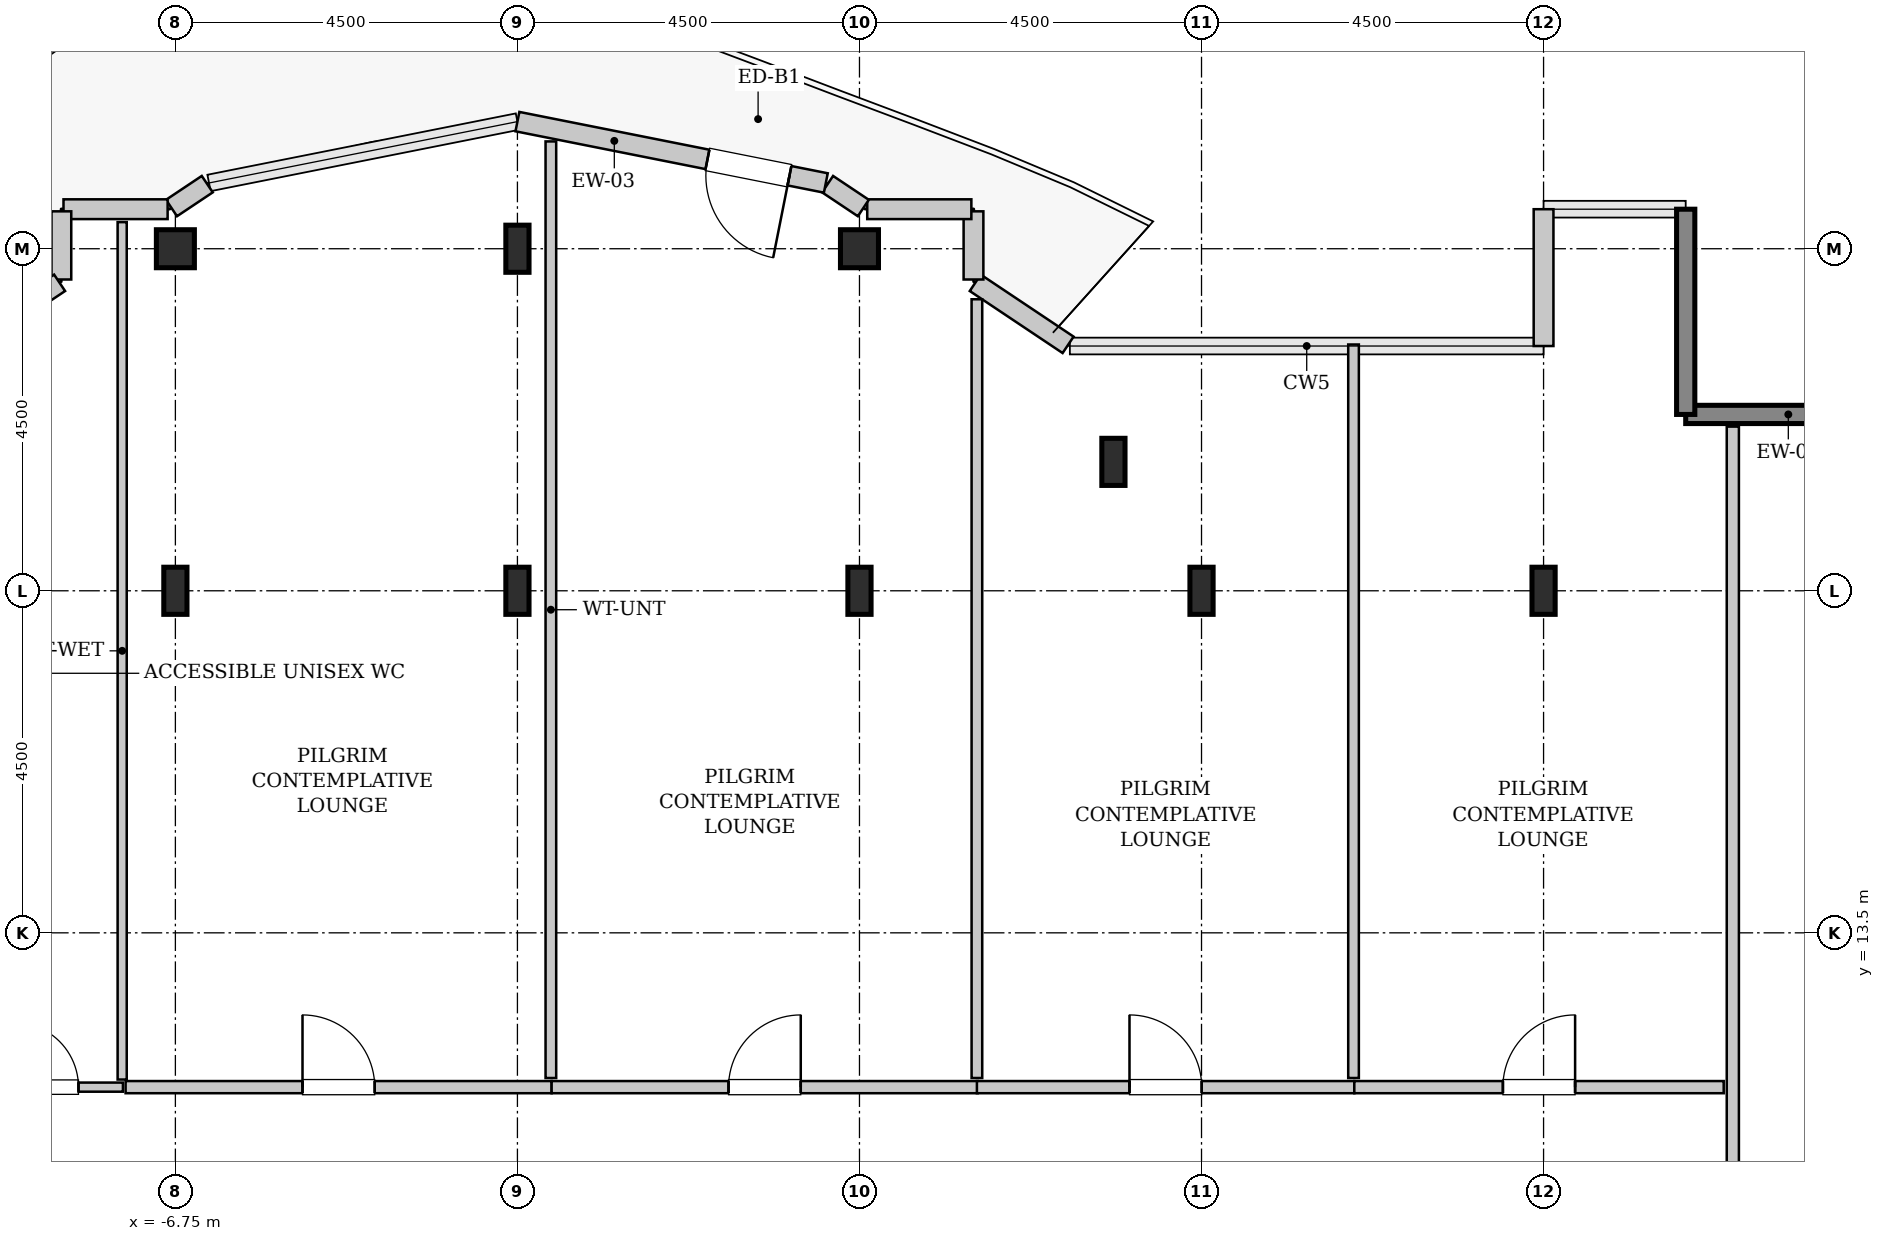
"""IFC4 building model, lengths in metres.
Left out: names, types, materials, properties, quantities, classifications, styles, units other than length and angle.
Written with IfcOpenShell. Run it as: python <this file> out.ifc"""

import sys

from ifc_helpers import new_model, si_unit, direction, frame, frame_2d, origin, origin_2d, place, context, subcontext, project, spatial, rectangle, hollow_rectangle, i_section, extrude, source, transform, mapped, element, fill, save


model = new_model("IFC4")
c1 = context("Model", 3, precision=1e-05, world=origin(), true_north=direction((0.0, 1.0)))
c2 = subcontext(c1, "Body", "Model", "MODEL_VIEW")
j1 = project(units=[si_unit("LENGTHUNIT", "METRE"), si_unit("PLANEANGLEUNIT", "RADIAN")], contexts=[c1])
p1 = place(None, origin())
s1 = spatial("IfcSite", under=j1, at=p1, CompositionType="ELEMENT")
p2 = place(p1, origin())
s2 = spatial("IfcBuilding", under=s1, at=p2, CompositionType="ELEMENT")
p3 = place(p2, frame((0.0, 0.0, 314.0)))
s3 = spatial("IfcBuildingStorey", under=s2, at=p3, CompositionType="ELEMENT", Elevation=314.0)
m1 = source(origin(), c2, "Body", "SweptSolid", [
    extrude(i_section(OverallWidth=0.305, OverallDepth=0.62, WebThickness=0.021, FlangeThickness=0.04, FilletRadius=0.027, at=origin_2d()), origin(), (0.0, 0.0, 1.0), 3.8),
])
p4 = place(p3, frame((-6.75, 18.0, 0.0), z_axis=(0.0, 0.0, 1.0), x_axis=(1.0, 0.0, 0.0)))
e1 = element("IfcColumn", 1, at=p4, inside=s3, PredefinedType="COLUMN", context=c2, shape_type="MappedRepresentation", body=[
    mapped(m1, transform((0.0, 0.0, 0.0), x_axis=(1.0, 0.0, 0.0), y_axis=(0.0, 1.0, 0.0), z_axis=(0.0, 0.0, 1.0), scale=1.0)),
])
m2 = source(origin(), c2, "Body", "SweptSolid", [
    extrude(hollow_rectangle(XDim=0.5, YDim=0.5, WallThickness=0.025, InnerFilletRadius=0.025, OuterFilletRadius=0.05, at=origin_2d()), origin(), (0.0, 0.0, 1.0), 3.8),
])
p5 = place(p3, frame((-6.75, 22.5, 0.0), z_axis=(0.0, 0.0, 1.0), x_axis=(1.0, 0.0, 0.0)))
e2 = element("IfcColumn", 2, at=p5, inside=s3, PredefinedType="COLUMN", context=c2, shape_type="MappedRepresentation", body=[
    mapped(m2, transform((0.0, 0.0, 0.0), x_axis=(1.0, 0.0, 0.0), y_axis=(0.0, 1.0, 0.0), z_axis=(0.0, 0.0, 1.0), scale=1.0)),
])
for number, where, z_axis, x_axis in (
    (3, (-2.25, 18.0, 0.0), (0.0, 0.0, 1.0), (1.0, 0.0, 0.0)),
    (4, (-2.25, 22.5, 0.0), (0.0, 0.0, 1.0), (1.0, 0.0, 0.0)),
    (5, (2.25, 18.0, 0.0), (0.0, 0.0, 1.0), (1.0, 0.0, 0.0)),
):
    element("IfcColumn", number, at=place(p3, frame(where, z_axis=z_axis, x_axis=x_axis)), inside=s3, PredefinedType="COLUMN", context=c2, shape_type="MappedRepresentation", body=[
        mapped(m1, transform((0.0, 0.0, 0.0), x_axis=(1.0, 0.0, 0.0), y_axis=(0.0, 1.0, 0.0), z_axis=(0.0, 0.0, 1.0), scale=1.0)),
    ])
p6 = place(p3, frame((2.25, 22.5, 0.0), z_axis=(0.0, 0.0, 1.0), x_axis=(1.0, 0.0, 0.0)))
e6 = element("IfcColumn", 6, at=p6, inside=s3, PredefinedType="COLUMN", context=c2, shape_type="MappedRepresentation", body=[
    mapped(m2, transform((0.0, 0.0, 0.0), x_axis=(1.0, 0.0, 0.0), y_axis=(0.0, 1.0, 0.0), z_axis=(0.0, 0.0, 1.0), scale=1.0)),
])
for number, where, z_axis, x_axis in (
    (7, (5.591, 19.696, 0.0), (0.0, 0.0, 1.0), (1.0, 0.0, 0.0)),
    (8, (6.75, 18.0, 0.0), (0.0, 0.0, 1.0), (1.0, 0.0, 0.0)),
    (9, (11.25, 18.0, 0.0), (0.0, 0.0, 1.0), (1.0, 0.0, 0.0)),
):
    element("IfcColumn", number, at=place(p3, frame(where, z_axis=z_axis, x_axis=x_axis)), inside=s3, PredefinedType="COLUMN", context=c2, shape_type="MappedRepresentation", body=[
        mapped(m1, transform((0.0, 0.0, 0.0), x_axis=(1.0, 0.0, 0.0), y_axis=(0.0, 1.0, 0.0), z_axis=(0.0, 0.0, 1.0), scale=1.0)),
    ])
m3 = source(origin(), c2, "Body", "SweptSolid", [
    extrude(rectangle(XDim=2.7, YDim=0.24, at=frame_2d((1.35, 0.0))), origin(), (0.0, 0.0, 1.0), 3.5),
])
for number, where, z_axis, x_axis in (
    (10, (15.82, 20.32, 0.0), (0.0, 0.0, 1.0), (-1.0, 0.0, 0.0)),
    (11, (13.12, 20.32, 0.0), (0.0, 0.0, 1.0), (0.0, 1.0, 0.0)),
):
    element("IfcWall", number, at=place(p3, frame(where, z_axis=z_axis, x_axis=x_axis)), inside=s3, PredefinedType="SHEAR", context=c2, shape_type="MappedRepresentation", body=[
        mapped(m3, transform((0.0, 0.0, 0.0), x_axis=(1.0, 0.0, 0.0), y_axis=(0.0, 1.0, 0.0), z_axis=(0.0, 0.0, 1.0), scale=1.0)),
    ])
m4 = source(origin(), c2, "Body", "SweptSolid", [
    extrude(rectangle(XDim=1.8, YDim=0.26, at=frame_2d((0.9, 0.0))), origin(), (0.0, 0.0, 1.0), 3.5),
])
p7 = place(p3, frame((11.25, 23.02, 0.0), z_axis=(0.0, 0.0, 1.0), x_axis=(0.0, -1.0, 0.0)))
e12 = element("IfcWall", 12, at=p7, inside=s3, PredefinedType="SOLIDWALL", context=c2, shape_type="MappedRepresentation", body=[
    mapped(m4, transform((0.0, 0.0, 0.0), x_axis=(1.0, 0.0, 0.0), y_axis=(0.0, 1.0, 0.0), z_axis=(0.0, 0.0, 1.0), scale=1.0)),
])
m5 = source(origin(), c2, "Body", "SweptSolid", [
    extrude(rectangle(XDim=1.469, YDim=0.26, at=frame_2d((0.734, 0.0))), origin(), (0.0, 0.0, 1.0), 3.5),
])
p8 = place(p3, frame((4.995, 21.236, 0.0), z_axis=(0.0, 0.0, 1.0), x_axis=(-0.831461760506, 0.555581983884, 0.0)))
e13 = element("IfcWall", 13, at=p8, inside=s3, PredefinedType="SOLIDWALL", context=c2, shape_type="MappedRepresentation", body=[
    mapped(m5, transform((0.0, 0.0, 0.0), x_axis=(1.0, 0.0, 0.0), y_axis=(0.0, 1.0, 0.0), z_axis=(0.0, 0.0, 1.0), scale=1.0)),
])
m6 = source(origin(), c2, "Body", "SweptSolid", [
    extrude(rectangle(XDim=0.897, YDim=0.26, at=frame_2d((0.448, 0.0))), origin(), (0.0, 0.0, 1.0), 3.5),
])
p9 = place(p3, frame((3.75, 22.095, 0.0), z_axis=(0.0, 0.0, 1.0), x_axis=(0.0, 1.0, 0.0)))
e14 = element("IfcWall", 14, at=p9, inside=s3, PredefinedType="SOLIDWALL", context=c2, shape_type="MappedRepresentation", body=[
    mapped(m6, transform((0.0, 0.0, 0.0), x_axis=(1.0, 0.0, 0.0), y_axis=(0.0, 1.0, 0.0), z_axis=(0.0, 0.0, 1.0), scale=1.0)),
])
m7 = source(origin(), c2, "Body", "SweptSolid", [
    extrude(rectangle(XDim=1.37, YDim=0.26, at=frame_2d((0.685, 0.0))), origin(), (0.0, 0.0, 1.0), 3.5),
])
p10 = place(p3, frame((3.722, 23.02, 0.0), z_axis=(0.0, 0.0, 1.0), x_axis=(-1.0, 0.0, 0.0)))
e15 = element("IfcWall", 15, at=p10, inside=s3, PredefinedType="SOLIDWALL", context=c2, shape_type="MappedRepresentation", body=[
    mapped(m7, transform((0.0, 0.0, 0.0), x_axis=(1.0, 0.0, 0.0), y_axis=(0.0, 1.0, 0.0), z_axis=(0.0, 0.0, 1.0), scale=1.0)),
])
m8 = source(origin(), c2, "Body", "SweptSolid", [
    extrude(rectangle(XDim=0.565, YDim=0.26, at=frame_2d((0.283, 0.0))), origin(), (0.0, 0.0, 1.0), 3.5),
])
p11 = place(p3, frame((2.301, 23.036, 0.0), z_axis=(0.0, 0.0, 1.0), x_axis=(-0.831651492666, 0.555297933317, 0.0)))
e16 = element("IfcWall", 16, at=p11, inside=s3, PredefinedType="SOLIDWALL", context=c2, shape_type="MappedRepresentation", body=[
    mapped(m8, transform((0.0, 0.0, 0.0), x_axis=(1.0, 0.0, 0.0), y_axis=(0.0, 1.0, 0.0), z_axis=(0.0, 0.0, 1.0), scale=1.0)),
])
m9 = source(origin(), c2, "Body", "SweptSolid", [
    extrude(rectangle(XDim=4.137, YDim=0.26, at=frame_2d((2.068, 0.0))), origin(), (0.0, 0.0, 1.0), 3.5),
])
p12 = place(p3, frame((1.807, 23.365, 0.0), z_axis=(0.0, 0.0, 1.0), x_axis=(-0.980782170794, 0.195105954428, 0.0)))
e17 = element("IfcWall", 17, at=p12, inside=s3, PredefinedType="SOLIDWALL", context=c2, shape_type="MappedRepresentation", body=[
    mapped(m9, transform((0.0, 0.0, 0.0), x_axis=(1.0, 0.0, 0.0), y_axis=(0.0, 1.0, 0.0), z_axis=(0.0, 0.0, 1.0), scale=1.0)),
])
p13 = place(p12, frame((0.488, 0.0, 0.0)))
e18 = element("IfcOpeningElement", 18, at=p13, cuts=e17, PredefinedType="OPENING", context=c2, shape_type="SweptSolid", body=[
    extrude(rectangle(XDim=1.1, YDim=2.2, at=frame_2d((0.55, 1.1))), frame((0.0, 0.14, 0.0), z_axis=(0.0, -1.0, 0.0), x_axis=(1.0, 0.0, 0.0)), (0.0, 0.0, 1.0), 0.28),
])
p14 = place(p3, frame((-6.331, 23.35, 0.0), z_axis=(0.0, 0.0, 1.0), x_axis=(-0.831651492666, -0.555297933317, 0.0)))
e19 = element("IfcWall", 19, at=p14, inside=s3, PredefinedType="SOLIDWALL", context=c2, shape_type="MappedRepresentation", body=[
    mapped(m8, transform((0.0, 0.0, 0.0), x_axis=(1.0, 0.0, 0.0), y_axis=(0.0, 1.0, 0.0), z_axis=(0.0, 0.0, 1.0), scale=1.0)),
])
p15 = place(p3, frame((-6.852, 23.02, 0.0), z_axis=(0.0, 0.0, 1.0), x_axis=(-1.0, 0.0, 0.0)))
e20 = element("IfcWall", 20, at=p15, inside=s3, PredefinedType="SOLIDWALL", context=c2, shape_type="MappedRepresentation", body=[
    mapped(m7, transform((0.0, 0.0, 0.0), x_axis=(1.0, 0.0, 0.0), y_axis=(0.0, 1.0, 0.0), z_axis=(0.0, 0.0, 1.0), scale=1.0)),
])
p16 = place(p3, frame((-8.25, 22.992, 0.0), z_axis=(0.0, 0.0, 1.0), x_axis=(0.0, -1.0, 0.0)))
e21 = element("IfcWall", 21, at=p16, inside=s3, PredefinedType="SOLIDWALL", context=c2, shape_type="MappedRepresentation", body=[
    mapped(m6, transform((0.0, 0.0, 0.0), x_axis=(1.0, 0.0, 0.0), y_axis=(0.0, 1.0, 0.0), z_axis=(0.0, 0.0, 1.0), scale=1.0)),
])
p17 = place(p3, frame((-8.273, 22.052, 0.0), z_axis=(0.0, 0.0, 1.0), x_axis=(-0.831461760506, -0.555581983884, 0.0)))
e22 = element("IfcWall", 22, at=p17, inside=s3, PredefinedType="SOLIDWALL", context=c2, shape_type="MappedRepresentation", body=[
    mapped(m5, transform((0.0, 0.0, 0.0), x_axis=(1.0, 0.0, 0.0), y_axis=(0.0, 1.0, 0.0), z_axis=(0.0, 0.0, 1.0), scale=1.0)),
])
m10 = source(origin(), c2, "Body", "SweptSolid", [
    extrude(rectangle(XDim=2.02, YDim=0.12, at=frame_2d((1.01, 0.0))), origin(), (0.0, 0.0, 1.0), 3.485),
])
p18 = place(p3, frame((-9.46, 11.47, 0.0), z_axis=(0.0, 0.0, 1.0), x_axis=(1.0, 0.0, 0.0)))
e23 = element("IfcWall", 23, at=p18, inside=s3, PredefinedType="PLUMBINGWALL", context=c2, shape_type="MappedRepresentation", body=[
    mapped(m10, transform((0.0, 0.0, 0.0), x_axis=(1.0, 0.0, 0.0), y_axis=(0.0, 1.0, 0.0), z_axis=(0.0, 0.0, 1.0), scale=1.0)),
])
p19 = place(p18, frame((0.585, 0.0, 0.0)))
e24 = element("IfcOpeningElement", 24, at=p19, cuts=e23, PredefinedType="OPENING", context=c2, shape_type="SweptSolid", body=[
    extrude(rectangle(XDim=0.85, YDim=2.1, at=frame_2d((0.425, 1.05))), frame((0.0, 0.07, 0.0), z_axis=(0.0, -1.0, 0.0), x_axis=(1.0, 0.0, 0.0)), (0.0, 0.0, 1.0), 0.14),
])
m11 = source(origin(), c2, "Body", "SweptSolid", [
    extrude(rectangle(XDim=11.28, YDim=0.12, at=frame_2d((5.64, 0.0))), origin(), (0.0, 0.0, 1.0), 3.485),
])
p20 = place(p3, frame((-7.45, 11.57, 0.0), z_axis=(0.0, 0.0, 1.0), x_axis=(0.0, 1.0, 0.0)))
e25 = element("IfcWall", 25, at=p20, inside=s3, PredefinedType="PLUMBINGWALL", context=c2, shape_type="MappedRepresentation", body=[
    mapped(m11, transform((0.0, 0.0, 0.0), x_axis=(1.0, 0.0, 0.0), y_axis=(0.0, 1.0, 0.0), z_axis=(0.0, 0.0, 1.0), scale=1.0)),
])
m12 = source(origin(), c2, "Body", "SweptSolid", [
    extrude(rectangle(XDim=12.565, YDim=0.16, at=frame_2d((6.282, 0.0))), origin(), (0.0, 0.0, 1.0), 3.485),
])
p21 = place(p3, frame((13.74, 7.595, 0.0), z_axis=(0.0, 0.0, 1.0), x_axis=(0.0, 1.0, 0.0)))
e26 = element("IfcWall", 26, at=p21, inside=s3, PredefinedType="PARTITIONING", context=c2, shape_type="MappedRepresentation", body=[
    mapped(m12, transform((0.0, 0.0, 0.0), x_axis=(1.0, 0.0, 0.0), y_axis=(0.0, 1.0, 0.0), z_axis=(0.0, 0.0, 1.0), scale=1.0)),
])
p22 = place(p21, frame((1.482, 0.0, 0.0)))
e27 = element("IfcOpeningElement", 27, at=p22, cuts=e26, PredefinedType="OPENING", context=c2, shape_type="SweptSolid", body=[
    extrude(rectangle(XDim=0.95, YDim=2.1, at=frame_2d((0.475, 1.05))), frame((0.0, 0.09, 0.0), z_axis=(0.0, -1.0, 0.0), x_axis=(1.0, 0.0, 0.0)), (0.0, 0.0, 1.0), 0.18),
])
m13 = source(origin(), c2, "Body", "SweptSolid", [
    extrude(rectangle(XDim=5.605, YDim=0.16, at=frame_2d((2.802, 0.0))), origin(), (0.0, 0.0, 1.0), 3.485),
])
p23 = place(p3, frame((-7.405, 11.47, 0.0), z_axis=(0.0, 0.0, 1.0), x_axis=(1.0, 0.0, 0.0)))
e28 = element("IfcWall", 28, at=p23, inside=s3, PredefinedType="PARTITIONING", context=c2, shape_type="MappedRepresentation", body=[
    mapped(m13, transform((0.0, 0.0, 0.0), x_axis=(1.0, 0.0, 0.0), y_axis=(0.0, 1.0, 0.0), z_axis=(0.0, 0.0, 1.0), scale=1.0)),
])
p24 = place(p23, frame((2.327, 0.0, 0.0)))
e29 = element("IfcOpeningElement", 29, at=p24, cuts=e28, PredefinedType="OPENING", context=c2, shape_type="SweptSolid", body=[
    extrude(rectangle(XDim=0.95, YDim=2.1, at=frame_2d((0.475, 1.05))), frame((0.0, 0.09, 0.0), z_axis=(0.0, -1.0, 0.0), x_axis=(1.0, 0.0, 0.0)), (0.0, 0.0, 1.0), 0.18),
])
m14 = source(origin(), c2, "Body", "SweptSolid", [
    extrude(rectangle(XDim=12.322, YDim=0.14, at=frame_2d((6.161, 0.0))), origin(), (0.0, 0.0, 1.0), 2.925),
])
p25 = place(p3, frame((-1.81, 11.59, 0.0), z_axis=(0.0, 0.0, 1.0), x_axis=(0.0, 1.0, 0.0)))
e30 = element("IfcWall", 30, at=p25, inside=s3, PredefinedType="PARTITIONING", context=c2, shape_type="MappedRepresentation", body=[
    mapped(m14, transform((0.0, 0.0, 0.0), x_axis=(1.0, 0.0, 0.0), y_axis=(0.0, 1.0, 0.0), z_axis=(0.0, 0.0, 1.0), scale=1.0)),
])
p26 = place(p3, frame((-1.8, 11.47, 0.0), z_axis=(0.0, 0.0, 1.0), x_axis=(1.0, 0.0, 0.0)))
e31 = element("IfcWall", 31, at=p26, inside=s3, PredefinedType="PARTITIONING", context=c2, shape_type="MappedRepresentation", body=[
    mapped(m13, transform((0.0, 0.0, 0.0), x_axis=(1.0, 0.0, 0.0), y_axis=(0.0, 1.0, 0.0), z_axis=(0.0, 0.0, 1.0), scale=1.0)),
])
p27 = place(p26, frame((2.327, 0.0, 0.0)))
e32 = element("IfcOpeningElement", 32, at=p27, cuts=e31, PredefinedType="OPENING", context=c2, shape_type="SweptSolid", body=[
    extrude(rectangle(XDim=0.95, YDim=2.1, at=frame_2d((0.475, 1.05))), frame((0.0, 0.09, 0.0), z_axis=(0.0, -1.0, 0.0), x_axis=(1.0, 0.0, 0.0)), (0.0, 0.0, 1.0), 0.18),
])
m15 = source(origin(), c2, "Body", "SweptSolid", [
    extrude(rectangle(XDim=10.245, YDim=0.14, at=frame_2d((5.123, 0.0))), origin(), (0.0, 0.0, 1.0), 3.485),
])
p28 = place(p3, frame((3.795, 11.59, 0.0), z_axis=(0.0, 0.0, 1.0), x_axis=(0.0, 1.0, 0.0)))
e33 = element("IfcWall", 33, at=p28, inside=s3, PredefinedType="PARTITIONING", context=c2, shape_type="MappedRepresentation", body=[
    mapped(m15, transform((0.0, 0.0, 0.0), x_axis=(1.0, 0.0, 0.0), y_axis=(0.0, 1.0, 0.0), z_axis=(0.0, 0.0, 1.0), scale=1.0)),
])
m16 = source(origin(), c2, "Body", "SweptSolid", [
    extrude(rectangle(XDim=4.965, YDim=0.16, at=frame_2d((2.482, 0.0))), origin(), (0.0, 0.0, 1.0), 3.485),
])
p29 = place(p3, frame((3.795, 11.47, 0.0), z_axis=(0.0, 0.0, 1.0), x_axis=(1.0, 0.0, 0.0)))
e34 = element("IfcWall", 34, at=p29, inside=s3, PredefinedType="PARTITIONING", context=c2, shape_type="MappedRepresentation", body=[
    mapped(m16, transform((0.0, 0.0, 0.0), x_axis=(1.0, 0.0, 0.0), y_axis=(0.0, 1.0, 0.0), z_axis=(0.0, 0.0, 1.0), scale=1.0)),
])
p30 = place(p29, frame((2.008, 0.0, 0.0)))
e35 = element("IfcOpeningElement", 35, at=p30, cuts=e34, PredefinedType="OPENING", context=c2, shape_type="SweptSolid", body=[
    extrude(rectangle(XDim=0.95, YDim=2.1, at=frame_2d((0.475, 1.05))), frame((0.0, 0.09, 0.0), z_axis=(0.0, -1.0, 0.0), x_axis=(1.0, 0.0, 0.0)), (0.0, 0.0, 1.0), 0.18),
])
m17 = source(origin(), c2, "Body", "SweptSolid", [
    extrude(rectangle(XDim=9.65, YDim=0.14, at=frame_2d((4.825, 0.0))), origin(), (0.0, 0.0, 1.0), 3.485),
])
p31 = place(p3, frame((8.75, 11.59, 0.0), z_axis=(0.0, 0.0, 1.0), x_axis=(0.0, 1.0, 0.0)))
e36 = element("IfcWall", 36, at=p31, inside=s3, PredefinedType="PARTITIONING", context=c2, shape_type="MappedRepresentation", body=[
    mapped(m17, transform((0.0, 0.0, 0.0), x_axis=(1.0, 0.0, 0.0), y_axis=(0.0, 1.0, 0.0), z_axis=(0.0, 0.0, 1.0), scale=1.0)),
])
m18 = source(origin(), c2, "Body", "SweptSolid", [
    extrude(rectangle(XDim=4.86, YDim=0.16, at=frame_2d((2.43, 0.0))), origin(), (0.0, 0.0, 1.0), 3.485),
])
p32 = place(p3, frame((8.76, 11.47, 0.0), z_axis=(0.0, 0.0, 1.0), x_axis=(1.0, 0.0, 0.0)))
e37 = element("IfcWall", 37, at=p32, inside=s3, PredefinedType="PARTITIONING", context=c2, shape_type="MappedRepresentation", body=[
    mapped(m18, transform((0.0, 0.0, 0.0), x_axis=(1.0, 0.0, 0.0), y_axis=(0.0, 1.0, 0.0), z_axis=(0.0, 0.0, 1.0), scale=1.0)),
])
p33 = place(p32, frame((1.955, 0.0, 0.0)))
e38 = element("IfcOpeningElement", 38, at=p33, cuts=e37, PredefinedType="OPENING", context=c2, shape_type="SweptSolid", body=[
    extrude(rectangle(XDim=0.95, YDim=2.1, at=frame_2d((0.475, 1.05))), frame((0.0, 0.09, 0.0), z_axis=(0.0, -1.0, 0.0), x_axis=(1.0, 0.0, 0.0)), (0.0, 0.0, 1.0), 0.18),
])
m19 = source(origin(), c2, "Body", "SweptSolid", [
    extrude(rectangle(XDim=1.1, YDim=2.2, at=frame_2d((0.55, 1.1))), frame((0.0, 0.025, 0.0), z_axis=(0.0, -1.0, 0.0), x_axis=(1.0, 0.0, 0.0)), (0.0, 0.0, 1.0), 0.05),
])
p34 = place(p13, origin())
e39 = element("IfcDoor", 39, at=p34, inside=s3, OperationType="SINGLE_SWING_LEFT", PredefinedType="DOOR", context=c2, shape_type="MappedRepresentation", body=[
    mapped(m19, transform((0.0, 0.0, 0.0), x_axis=(1.0, 0.0, 0.0), y_axis=(0.0, 1.0, 0.0), z_axis=(0.0, 0.0, 1.0), scale=1.0)),
])
fill(e18, e39)
m20 = source(origin(), c2, "Body", "SweptSolid", [
    extrude(rectangle(XDim=0.85, YDim=2.1, at=frame_2d((0.425, 1.05))), frame((0.0, 0.025, 0.0), z_axis=(0.0, -1.0, 0.0), x_axis=(1.0, 0.0, 0.0)), (0.0, 0.0, 1.0), 0.05),
])
p35 = place(p19, origin())
e40 = element("IfcDoor", 40, at=p35, inside=s3, OperationType="SINGLE_SWING_LEFT", PredefinedType="DOOR", context=c2, shape_type="MappedRepresentation", body=[
    mapped(m20, transform((0.0, 0.0, 0.0), x_axis=(1.0, 0.0, 0.0), y_axis=(0.0, 1.0, 0.0), z_axis=(0.0, 0.0, 1.0), scale=1.0)),
])
fill(e24, e40)
m21 = source(origin(), c2, "Body", "SweptSolid", [
    extrude(rectangle(XDim=0.95, YDim=2.1, at=frame_2d((0.475, 1.05))), frame((0.0, 0.025, 0.0), z_axis=(0.0, -1.0, 0.0), x_axis=(1.0, 0.0, 0.0)), (0.0, 0.0, 1.0), 0.05),
])
p36 = place(p24, origin())
e41 = element("IfcDoor", 41, at=p36, inside=s3, OperationType="SINGLE_SWING_LEFT", PredefinedType="DOOR", context=c2, shape_type="MappedRepresentation", body=[
    mapped(m21, transform((0.0, 0.0, 0.0), x_axis=(1.0, 0.0, 0.0), y_axis=(0.0, 1.0, 0.0), z_axis=(0.0, 0.0, 1.0), scale=1.0)),
])
fill(e29, e41)
p37 = place(p27, origin())
e42 = element("IfcDoor", 42, at=p37, inside=s3, OperationType="SINGLE_SWING_RIGHT", PredefinedType="DOOR", context=c2, shape_type="MappedRepresentation", body=[
    mapped(m21, transform((0.0, 0.0, 0.0), x_axis=(1.0, 0.0, 0.0), y_axis=(0.0, 1.0, 0.0), z_axis=(0.0, 0.0, 1.0), scale=1.0)),
])
fill(e32, e42)
p38 = place(p30, origin())
e43 = element("IfcDoor", 43, at=p38, inside=s3, OperationType="SINGLE_SWING_LEFT", PredefinedType="DOOR", context=c2, shape_type="MappedRepresentation", body=[
    mapped(m21, transform((0.0, 0.0, 0.0), x_axis=(1.0, 0.0, 0.0), y_axis=(0.0, 1.0, 0.0), z_axis=(0.0, 0.0, 1.0), scale=1.0)),
])
fill(e35, e43)
p39 = place(p33, origin())
e44 = element("IfcDoor", 44, at=p39, inside=s3, OperationType="SINGLE_SWING_RIGHT", PredefinedType="DOOR", context=c2, shape_type="MappedRepresentation", body=[
    mapped(m21, transform((0.0, 0.0, 0.0), x_axis=(1.0, 0.0, 0.0), y_axis=(0.0, 1.0, 0.0), z_axis=(0.0, 0.0, 1.0), scale=1.0)),
])
fill(e38, e44)
save(model, sys.argv[1])
